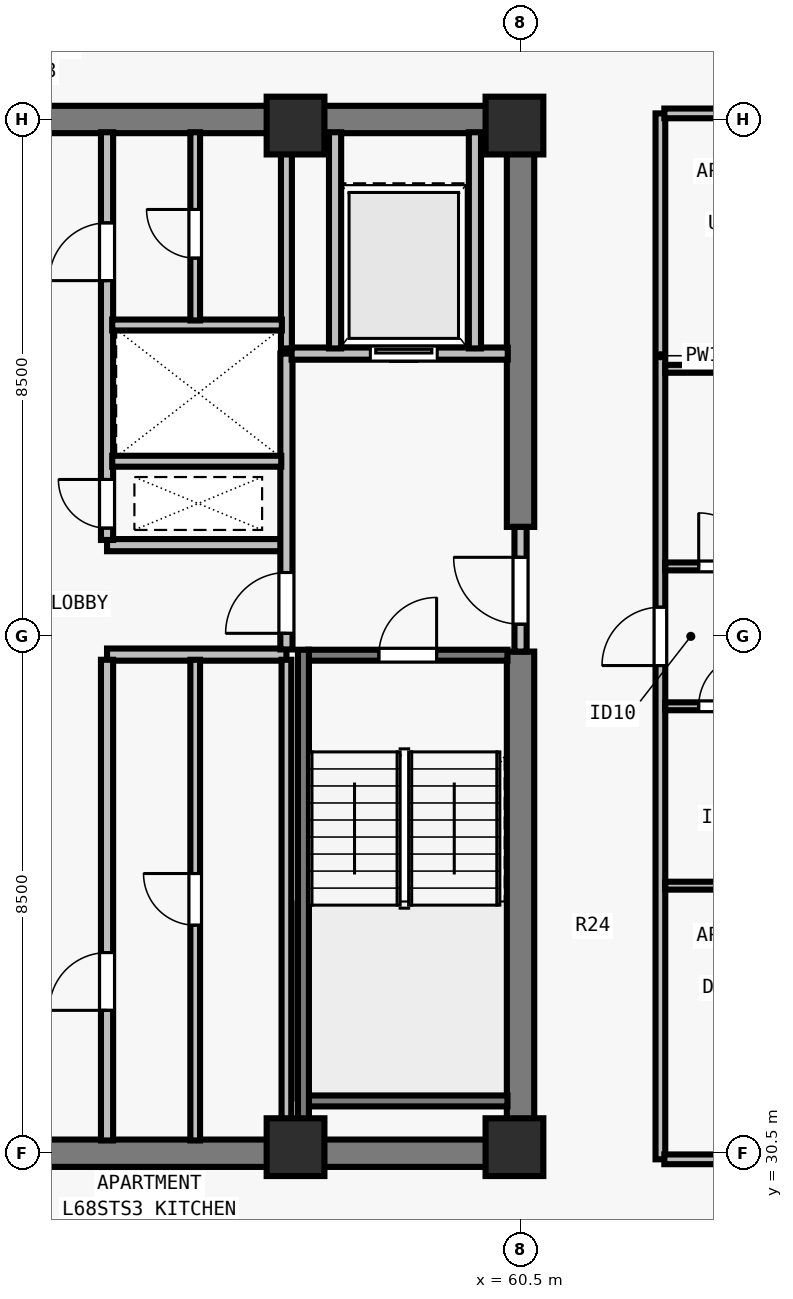
"""IFC4 building model, lengths in metres.
Left out: names, types, materials, properties, quantities, classifications, styles, units other than length and angle.
Written with IfcOpenShell. Run it as: python <this file> out.ifc"""

import sys

from ifc_helpers import new_model, si_unit, direction, frame, frame_2d, origin, origin_2d, place, context, subcontext, project, spatial, rectangle, extrude, element, fill, save


model = new_model("IFC4")
c1 = context("Model", 3, precision=1e-05, world=origin(), true_north=direction((0.0, 1.0)))
c2 = subcontext(c1, "Body", "Model", "MODEL_VIEW")
j1 = project(units=[si_unit("LENGTHUNIT", "METRE"), si_unit("PLANEANGLEUNIT", "RADIAN")], contexts=[c1])
p1 = place(None, origin())
s1 = spatial("IfcSite", under=j1, at=p1, CompositionType="ELEMENT")
p2 = place(p1, origin())
s2 = spatial("IfcBuilding", under=s1, at=p2, CompositionType="ELEMENT")
p3 = place(p2, frame((0.0, 0.0, 248.0)))
s3 = spatial("IfcBuildingStorey", under=s2, at=p3, CompositionType="ELEMENT", Elevation=248.0)
for number, where, z_axis, x_axis in (
    (1, (56.8, 30.6, 0.0), (0.0, 0.0, 1.0), (1.0, 0.0, 0.0)),
    (2, (60.4, 30.6, 0.0), (0.0, 0.0, 1.0), (1.0, 0.0, 0.0)),
    (3, (56.8, 47.4, 0.0), (0.0, 0.0, 1.0), (1.0, 0.0, 0.0)),
    (4, (60.4, 47.4, 0.0), (0.0, 0.0, 1.0), (1.0, 0.0, 0.0)),
):
    element("IfcColumn", number, at=place(p3, frame(where, z_axis=z_axis, x_axis=x_axis)), inside=s3, PredefinedType="COLUMN", context=c2, shape_type="SweptSolid", body=[
        extrude(rectangle(XDim=0.95, YDim=0.95, at=origin_2d()), origin(), (0.0, 0.0, 1.0), 3.5),
    ])
for number, where, z_axis, x_axis in (
    (5, (43.275, 30.5, 0.0), (0.0, 0.0, 1.0), (1.0, 0.0, 0.0)),
    (6, (43.275, 47.5, 0.0), (0.0, 0.0, 1.0), (1.0, 0.0, 0.0)),
):
    element("IfcWall", number, at=place(p3, frame(where, z_axis=z_axis, x_axis=x_axis)), inside=s3, PredefinedType="SHEAR", context=c2, shape_type="SweptSolid", body=[
        extrude(rectangle(XDim=17.45, YDim=0.45, at=frame_2d((8.725, 0.0))), origin(), (0.0, 0.0, 1.0), 3.29),
    ])
p4 = place(p3, frame((60.5, 30.715, 0.0), z_axis=(0.0, 0.0, 1.0), x_axis=(0.0, 1.0, 0.0)))
e7 = element("IfcWall", 7, at=p4, inside=s3, PredefinedType="SHEAR", context=c2, shape_type="SweptSolid", body=[
    extrude(rectangle(XDim=8.035, YDim=0.45, at=frame_2d((4.018, 0.0))), origin(), (0.0, 0.0, 1.0), 3.29),
])
p5 = place(p3, frame((60.5, 40.8, 0.0), z_axis=(0.0, 0.0, 1.0), x_axis=(0.0, 1.0, 0.0)))
e8 = element("IfcWall", 8, at=p5, inside=s3, PredefinedType="SHEAR", context=c2, shape_type="SweptSolid", body=[
    extrude(rectangle(XDim=6.485, YDim=0.45, at=frame_2d((3.242, 0.0))), origin(), (0.0, 0.0, 1.0), 3.29),
])
for number, where, z_axis, x_axis in (
    (9, (53.7, 38.7, 0.0), (0.0, 0.0, 1.0), (1.0, 0.0, 0.0)),
    (10, (53.7, 40.5, 0.0), (0.0, 0.0, 1.0), (1.0, 0.0, 0.0)),
):
    element("IfcWall", number, at=place(p3, frame(where, z_axis=z_axis, x_axis=x_axis)), inside=s3, PredefinedType="SOLIDWALL", context=c2, shape_type="SweptSolid", body=[
        extrude(rectangle(XDim=2.95, YDim=0.2, at=frame_2d((1.475, 0.0))), origin(), (0.0, 0.0, 1.0), 3.29),
    ])
p6 = place(p3, frame((53.7, 30.71, 0.0), z_axis=(0.0, 0.0, 1.0), x_axis=(0.0, 1.0, 0.0)))
e11 = element("IfcWall", 11, at=p6, inside=s3, PredefinedType="SOLIDWALL", context=c2, shape_type="SweptSolid", body=[
    extrude(rectangle(XDim=7.905, YDim=0.2, at=frame_2d((3.953, 0.0))), origin(), (0.0, 0.0, 1.0), 3.29),
])
p7 = place(p6, frame((2.14, 0.0, 0.0)))
e12 = element("IfcOpeningElement", 12, at=p7, cuts=e11, PredefinedType="OPENING", context=c2, shape_type="SweptSolid", body=[
    extrude(rectangle(XDim=0.95, YDim=2.12, at=frame_2d((0.475, 1.06))), frame((0.0, 0.11, 0.0), z_axis=(0.0, -1.0, 0.0), x_axis=(1.0, 0.0, 0.0)), (0.0, 0.0, 1.0), 0.22),
])
p8 = place(p3, frame((53.7, 40.585, 0.0), z_axis=(0.0, 0.0, 1.0), x_axis=(0.0, 1.0, 0.0)))
e13 = element("IfcWall", 13, at=p8, inside=s3, PredefinedType="SOLIDWALL", context=c2, shape_type="SweptSolid", body=[
    extrude(rectangle(XDim=6.705, YDim=0.2, at=frame_2d((3.353, 0.0))), origin(), (0.0, 0.0, 1.0), 3.29),
])
p9 = place(p8, frame((0.195, 0.0, 0.0)))
e14 = element("IfcOpeningElement", 14, at=p9, cuts=e13, PredefinedType="OPENING", context=c2, shape_type="SweptSolid", body=[
    extrude(rectangle(XDim=0.8, YDim=2.08, at=frame_2d((0.4, 1.04))), frame((0.0, 0.11, 0.0), z_axis=(0.0, -1.0, 0.0), x_axis=(1.0, 0.0, 0.0)), (0.0, 0.0, 1.0), 0.22),
])
p10 = place(p8, frame((4.265, 0.0, 0.0)))
e15 = element("IfcOpeningElement", 15, at=p10, cuts=e13, PredefinedType="OPENING", context=c2, shape_type="SweptSolid", body=[
    extrude(rectangle(XDim=0.95, YDim=2.12, at=frame_2d((0.475, 1.06))), frame((0.0, 0.11, 0.0), z_axis=(0.0, -1.0, 0.0), x_axis=(1.0, 0.0, 0.0)), (0.0, 0.0, 1.0), 0.22),
])
p11 = place(p3, frame((60.5, 38.75, 0.0), z_axis=(0.0, 0.0, 1.0), x_axis=(0.0, 1.0, 0.0)))
e16 = element("IfcWall", 16, at=p11, inside=s3, PredefinedType="SOLIDWALL", context=c2, shape_type="SweptSolid", body=[
    extrude(rectangle(XDim=2.05, YDim=0.2, at=frame_2d((1.025, 0.0))), origin(), (0.0, 0.0, 1.0), 3.29),
])
p12 = place(p11, frame((0.45, 0.0, 0.0)))
e17 = element("IfcOpeningElement", 17, at=p12, cuts=e16, PredefinedType="OPENING", context=c2, shape_type="SweptSolid", body=[
    extrude(rectangle(XDim=1.1, YDim=2.15, at=frame_2d((0.55, 1.075))), frame((0.0, 0.11, 0.0), z_axis=(0.0, -1.0, 0.0), x_axis=(1.0, 0.0, 0.0)), (0.0, 0.0, 1.0), 0.22),
])
p13 = place(p3, frame((56.65, 38.785, 0.0), z_axis=(0.0, 0.0, 1.0), x_axis=(0.0, 1.0, 0.0)))
e18 = element("IfcWall", 18, at=p13, inside=s3, PredefinedType="SOLIDWALL", context=c2, shape_type="SweptSolid", body=[
    extrude(rectangle(XDim=4.865, YDim=0.2, at=frame_2d((2.433, 0.0))), origin(), (0.0, 0.0, 1.0), 3.29),
])
p14 = place(p13, frame((0.265, 0.0, 0.0)))
e19 = element("IfcOpeningElement", 19, at=p14, cuts=e18, PredefinedType="OPENING", context=c2, shape_type="SweptSolid", body=[
    extrude(rectangle(XDim=1.0, YDim=2.15, at=frame_2d((0.5, 1.075))), frame((0.0, 0.11, 0.0), z_axis=(0.0, -1.0, 0.0), x_axis=(1.0, 0.0, 0.0)), (0.0, 0.0, 1.0), 0.22),
])
p15 = place(p3, frame((56.735, 43.65, 0.0), z_axis=(0.0, 0.0, 1.0), x_axis=(1.0, 0.0, 0.0)))
e20 = element("IfcWall", 20, at=p15, inside=s3, PredefinedType="SOLIDWALL", context=c2, shape_type="SweptSolid", body=[
    extrude(rectangle(XDim=3.555, YDim=0.2, at=frame_2d((1.777, 0.0))), origin(), (0.0, 0.0, 1.0), 3.29),
])
p16 = place(p15, frame((1.295, 0.0, 0.0)))
e21 = element("IfcOpeningElement", 21, at=p16, cuts=e20, PredefinedType="OPENING", context=c2, shape_type="SweptSolid", body=[
    extrude(rectangle(XDim=1.1, YDim=2.2, at=frame_2d((0.55, 1.1))), frame((0.0, 0.11, 0.0), z_axis=(0.0, -1.0, 0.0), x_axis=(1.0, 0.0, 0.0)), (0.0, 0.0, 1.0), 0.22),
])
for number, where, z_axis, x_axis in (
    (22, (57.45, 43.735, 0.0), (0.0, 0.0, 1.0), (0.0, 1.0, 0.0)),
    (23, (59.75, 43.735, 0.0), (0.0, 0.0, 1.0), (0.0, 1.0, 0.0)),
):
    element("IfcWall", number, at=place(p3, frame(where, z_axis=z_axis, x_axis=x_axis)), inside=s3, PredefinedType="SOLIDWALL", context=c2, shape_type="SweptSolid", body=[
        extrude(rectangle(XDim=3.555, YDim=0.2, at=frame_2d((1.777, 0.0))), origin(), (0.0, 0.0, 1.0), 3.29),
    ])
p17 = place(p3, frame((56.65, 30.71, 0.0), z_axis=(0.0, 0.0, 1.0), x_axis=(0.0, 1.0, 0.0)))
e24 = element("IfcWall", 24, at=p17, inside=s3, PredefinedType="PARTITIONING", context=c2, shape_type="SweptSolid", body=[
    extrude(rectangle(XDim=7.905, YDim=0.16, at=frame_2d((3.953, 0.0))), origin(), (0.0, 0.0, 1.0), 3.29),
])
p18 = place(p3, frame((55.15, 30.71, 0.0), z_axis=(0.0, 0.0, 1.0), x_axis=(0.0, 1.0, 0.0)))
e25 = element("IfcWall", 25, at=p18, inside=s3, PredefinedType="PARTITIONING", context=c2, shape_type="SweptSolid", body=[
    extrude(rectangle(XDim=7.905, YDim=0.16, at=frame_2d((3.953, 0.0))), origin(), (0.0, 0.0, 1.0), 3.29),
])
p19 = place(p18, frame((3.54, 0.0, 0.0)))
e26 = element("IfcOpeningElement", 26, at=p19, cuts=e25, PredefinedType="OPENING", context=c2, shape_type="SweptSolid", body=[
    extrude(rectangle(XDim=0.85, YDim=2.12, at=frame_2d((0.425, 1.06))), frame((0.0, 0.09, 0.0), z_axis=(0.0, -1.0, 0.0), x_axis=(1.0, 0.0, 0.0)), (0.0, 0.0, 1.0), 0.18),
])
p20 = place(p3, frame((56.65, 43.735, 0.0), z_axis=(0.0, 0.0, 1.0), x_axis=(0.0, 1.0, 0.0)))
e27 = element("IfcWall", 27, at=p20, inside=s3, PredefinedType="SOLIDWALL", context=c2, shape_type="SweptSolid", body=[
    extrude(rectangle(XDim=3.555, YDim=0.18, at=frame_2d((1.777, 0.0))), origin(), (0.0, 0.0, 1.0), 3.29),
])
p21 = place(p3, frame((53.785, 41.88, 0.0), z_axis=(0.0, 0.0, 1.0), x_axis=(1.0, 0.0, 0.0)))
e28 = element("IfcWall", 28, at=p21, inside=s3, PredefinedType="SOLIDWALL", context=c2, shape_type="SweptSolid", body=[
    extrude(rectangle(XDim=2.78, YDim=0.18, at=frame_2d((1.39, 0.0))), origin(), (0.0, 0.0, 1.0), 3.29),
])
p22 = place(p3, frame((53.785, 44.12, 0.0), z_axis=(0.0, 0.0, 1.0), x_axis=(1.0, 0.0, 0.0)))
e29 = element("IfcWall", 29, at=p22, inside=s3, PredefinedType="SOLIDWALL", context=c2, shape_type="SweptSolid", body=[
    extrude(rectangle(XDim=2.79, YDim=0.18, at=frame_2d((1.395, 0.0))), origin(), (0.0, 0.0, 1.0), 3.29),
])
p23 = place(p3, frame((55.15, 44.195, 0.0), z_axis=(0.0, 0.0, 1.0), x_axis=(0.0, 1.0, 0.0)))
e30 = element("IfcWall", 30, at=p23, inside=s3, PredefinedType="PARTITIONING", context=c2, shape_type="SweptSolid", body=[
    extrude(rectangle(XDim=3.095, YDim=0.16, at=frame_2d((1.547, 0.0))), origin(), (0.0, 0.0, 1.0), 3.29),
])
p24 = place(p23, frame((1.025, 0.0, 0.0)))
e31 = element("IfcOpeningElement", 31, at=p24, cuts=e30, PredefinedType="OPENING", context=c2, shape_type="SweptSolid", body=[
    extrude(rectangle(XDim=0.8, YDim=2.1, at=frame_2d((0.4, 1.05))), frame((0.0, 0.09, 0.0), z_axis=(0.0, -1.0, 0.0), x_axis=(1.0, 0.0, 0.0)), (0.0, 0.0, 1.0), 0.18),
])
p25 = place(p3, frame((62.8, 30.4, 0.0), z_axis=(0.0, 0.0, 1.0), x_axis=(0.0, 1.0, 0.0)))
e32 = element("IfcWall", 32, at=p25, inside=s3, PredefinedType="PARTITIONING", context=c2, shape_type="SweptSolid", body=[
    extrude(rectangle(XDim=17.2, YDim=0.16, at=frame_2d((8.6, 0.0))), origin(), (0.0, 0.0, 1.0), 3.29),
])
p26 = place(p25, frame((8.12, 0.0, 0.0)))
e33 = element("IfcOpeningElement", 33, at=p26, cuts=e32, PredefinedType="OPENING", context=c2, shape_type="SweptSolid", body=[
    extrude(rectangle(XDim=0.96, YDim=2.18, at=frame_2d((0.48, 1.09))), frame((0.0, 0.09, 0.0), z_axis=(0.0, -1.0, 0.0), x_axis=(1.0, 0.0, 0.0)), (0.0, 0.0, 1.0), 0.18),
])
for number, where, z_axis, x_axis in (
    (34, (62.865, 30.4, 0.0), (0.0, 0.0, 1.0), (1.0, 0.0, 0.0)),
    (35, (62.865, 47.6, 0.0), (0.0, 0.0, 1.0), (1.0, 0.0, 0.0)),
):
    element("IfcWall", number, at=place(p3, frame(where, z_axis=z_axis, x_axis=x_axis)), inside=s3, PredefinedType="PARTITIONING", context=c2, shape_type="SweptSolid", body=[
        extrude(rectangle(XDim=11.33, YDim=0.16, at=frame_2d((5.665, 0.0))), origin(), (0.0, 0.0, 1.0), 3.29),
    ])
p27 = place(p3, frame((62.88, 34.9, 0.0), z_axis=(0.0, 0.0, 1.0), x_axis=(1.0, 0.0, 0.0)))
e36 = element("IfcWall", 36, at=p27, inside=s3, PredefinedType="PLUMBINGWALL", context=c2, shape_type="SweptSolid", body=[
    extrude(rectangle(XDim=2.75, YDim=0.13, at=frame_2d((1.375, 0.0))), origin(), (0.0, 0.0, 1.0), 3.29),
])
p28 = place(p3, frame((62.88, 37.85, 0.0), z_axis=(0.0, 0.0, 1.0), x_axis=(1.0, 0.0, 0.0)))
e37 = element("IfcWall", 37, at=p28, inside=s3, PredefinedType="PLUMBINGWALL", context=c2, shape_type="SweptSolid", body=[
    extrude(rectangle(XDim=2.75, YDim=0.13, at=frame_2d((1.375, 0.0))), origin(), (0.0, 0.0, 1.0), 3.29),
])
p29 = place(p28, frame((0.55, 0.0, 0.0)))
e38 = element("IfcOpeningElement", 38, at=p29, cuts=e37, PredefinedType="OPENING", context=c2, shape_type="SweptSolid", body=[
    extrude(rectangle(XDim=0.85, YDim=2.08, at=frame_2d((0.425, 1.04))), frame((0.0, 0.075, 0.0), z_axis=(0.0, -1.0, 0.0), x_axis=(1.0, 0.0, 0.0)), (0.0, 0.0, 1.0), 0.15),
])
p30 = place(p3, frame((62.88, 43.4, 0.0), z_axis=(0.0, 0.0, 1.0), x_axis=(1.0, 0.0, 0.0)))
e39 = element("IfcWall", 39, at=p30, inside=s3, PredefinedType="PLUMBINGWALL", context=c2, shape_type="SweptSolid", body=[
    extrude(rectangle(XDim=2.75, YDim=0.13, at=frame_2d((1.375, 0.0))), origin(), (0.0, 0.0, 1.0), 3.29),
])
p31 = place(p3, frame((62.88, 40.15, 0.0), z_axis=(0.0, 0.0, 1.0), x_axis=(1.0, 0.0, 0.0)))
e40 = element("IfcWall", 40, at=p31, inside=s3, PredefinedType="PLUMBINGWALL", context=c2, shape_type="SweptSolid", body=[
    extrude(rectangle(XDim=2.75, YDim=0.13, at=frame_2d((1.375, 0.0))), origin(), (0.0, 0.0, 1.0), 3.29),
])
p32 = place(p31, frame((0.55, 0.0, 0.0)))
e41 = element("IfcOpeningElement", 41, at=p32, cuts=e40, PredefinedType="OPENING", context=c2, shape_type="SweptSolid", body=[
    extrude(rectangle(XDim=0.88, YDim=2.1, at=frame_2d((0.44, 1.05))), frame((0.0, 0.075, 0.0), z_axis=(0.0, -1.0, 0.0), x_axis=(1.0, 0.0, 0.0)), (0.0, 0.0, 1.0), 0.15),
])
p33 = place(p3, frame((57.005, 38.69, 0.0), z_axis=(0.0, 0.0, 1.0), x_axis=(1.0, 0.0, 0.0)))
e42 = element("IfcWall", 42, at=p33, inside=s3, PredefinedType="SOLIDWALL", context=c2, shape_type="SweptSolid", body=[
    extrude(rectangle(XDim=3.28, YDim=0.18, at=frame_2d((1.64, 0.0))), origin(), (0.0, 0.0, 1.0), 3.29),
])
p34 = place(p33, frame((1.165, 0.0, 0.0)))
e43 = element("IfcOpeningElement", 43, at=p34, cuts=e42, PredefinedType="OPENING", context=c2, shape_type="SweptSolid", body=[
    extrude(rectangle(XDim=0.95, YDim=2.15, at=frame_2d((0.475, 1.075))), frame((0.0, 0.1, 0.0), z_axis=(0.0, -1.0, 0.0), x_axis=(1.0, 0.0, 0.0)), (0.0, 0.0, 1.0), 0.2),
])
p35 = place(p3, frame((57.005, 31.36, 0.0), z_axis=(0.0, 0.0, 1.0), x_axis=(1.0, 0.0, 0.0)))
e44 = element("IfcWall", 44, at=p35, inside=s3, PredefinedType="SOLIDWALL", context=c2, shape_type="SweptSolid", body=[
    extrude(rectangle(XDim=3.28, YDim=0.18, at=frame_2d((1.64, 0.0))), origin(), (0.0, 0.0, 1.0), 3.29),
])
p36 = place(p3, frame((56.93, 38.78, 0.0), z_axis=(0.0, 0.0, 1.0), x_axis=(0.0, -1.0, 0.0)))
e45 = element("IfcWall", 45, at=p36, inside=s3, PredefinedType="SOLIDWALL", context=c2, shape_type="SweptSolid", body=[
    extrude(rectangle(XDim=8.067, YDim=0.18, at=frame_2d((4.034, 0.0))), origin(), (0.0, 0.0, 1.0), 3.29),
])
p37 = place(p12, origin())
e46 = element("IfcDoor", 46, at=p37, inside=s3, OperationType="SINGLE_SWING_RIGHT", PredefinedType="DOOR", context=c2, shape_type="SweptSolid", body=[
    extrude(rectangle(XDim=1.1, YDim=2.15, at=frame_2d((0.55, 1.075))), frame((0.0, 0.025, 0.0), z_axis=(0.0, -1.0, 0.0), x_axis=(1.0, 0.0, 0.0)), (0.0, 0.0, 1.0), 0.05),
])
fill(e17, e46)
p38 = place(p14, origin())
e47 = element("IfcDoor", 47, at=p38, inside=s3, OperationType="SINGLE_SWING_LEFT", PredefinedType="DOOR", context=c2, shape_type="SweptSolid", body=[
    extrude(rectangle(XDim=1.0, YDim=2.15, at=frame_2d((0.5, 1.075))), frame((0.0, 0.025, 0.0), z_axis=(0.0, -1.0, 0.0), x_axis=(1.0, 0.0, 0.0)), (0.0, 0.0, 1.0), 0.05),
])
fill(e19, e47)
p39 = place(p16, origin())
e48 = element("IfcDoor", 48, at=p39, inside=s3, OperationType="SLIDING_TO_LEFT", PredefinedType="DOOR", context=c2, shape_type="SweptSolid", body=[
    extrude(rectangle(XDim=1.1, YDim=2.2, at=frame_2d((0.55, 1.1))), frame((0.0, 0.025, 0.0), z_axis=(0.0, -1.0, 0.0), x_axis=(1.0, 0.0, 0.0)), (0.0, 0.0, 1.0), 0.05),
])
fill(e21, e48)
p40 = place(p7, origin())
e49 = element("IfcDoor", 49, at=p40, inside=s3, OperationType="SINGLE_SWING_LEFT", PredefinedType="DOOR", context=c2, shape_type="SweptSolid", body=[
    extrude(rectangle(XDim=0.95, YDim=2.12, at=frame_2d((0.475, 1.06))), frame((0.0, 0.025, 0.0), z_axis=(0.0, -1.0, 0.0), x_axis=(1.0, 0.0, 0.0)), (0.0, 0.0, 1.0), 0.05),
])
fill(e12, e49)
p41 = place(p19, origin())
e50 = element("IfcDoor", 50, at=p41, inside=s3, OperationType="SINGLE_SWING_RIGHT", PredefinedType="DOOR", context=c2, shape_type="SweptSolid", body=[
    extrude(rectangle(XDim=0.85, YDim=2.12, at=frame_2d((0.425, 1.06))), frame((0.0, 0.025, 0.0), z_axis=(0.0, -1.0, 0.0), x_axis=(1.0, 0.0, 0.0)), (0.0, 0.0, 1.0), 0.05),
])
fill(e26, e50)
p42 = place(p9, origin())
e51 = element("IfcDoor", 51, at=p42, inside=s3, OperationType="SINGLE_SWING_RIGHT", PredefinedType="DOOR", context=c2, shape_type="SweptSolid", body=[
    extrude(rectangle(XDim=0.8, YDim=2.08, at=frame_2d((0.4, 1.04))), frame((0.0, 0.025, 0.0), z_axis=(0.0, -1.0, 0.0), x_axis=(1.0, 0.0, 0.0)), (0.0, 0.0, 1.0), 0.05),
])
fill(e14, e51)
p43 = place(p10, origin())
e52 = element("IfcDoor", 52, at=p43, inside=s3, OperationType="SINGLE_SWING_LEFT", PredefinedType="DOOR", context=c2, shape_type="SweptSolid", body=[
    extrude(rectangle(XDim=0.95, YDim=2.12, at=frame_2d((0.475, 1.06))), frame((0.0, 0.025, 0.0), z_axis=(0.0, -1.0, 0.0), x_axis=(1.0, 0.0, 0.0)), (0.0, 0.0, 1.0), 0.05),
])
fill(e15, e52)
p44 = place(p24, origin())
e53 = element("IfcDoor", 53, at=p44, inside=s3, OperationType="SINGLE_SWING_RIGHT", PredefinedType="DOOR", context=c2, shape_type="SweptSolid", body=[
    extrude(rectangle(XDim=0.8, YDim=2.1, at=frame_2d((0.4, 1.05))), frame((0.0, 0.025, 0.0), z_axis=(0.0, -1.0, 0.0), x_axis=(1.0, 0.0, 0.0)), (0.0, 0.0, 1.0), 0.05),
])
fill(e31, e53)
p45 = place(p29, origin())
e54 = element("IfcDoor", 54, at=p45, inside=s3, OperationType="SINGLE_SWING_RIGHT", PredefinedType="DOOR", context=c2, shape_type="SweptSolid", body=[
    extrude(rectangle(XDim=0.85, YDim=2.08, at=frame_2d((0.425, 1.04))), frame((0.0, 0.025, 0.0), z_axis=(0.0, -1.0, 0.0), x_axis=(1.0, 0.0, 0.0)), (0.0, 0.0, 1.0), 0.05),
])
fill(e38, e54)
p46 = place(p32, origin())
e55 = element("IfcDoor", 55, at=p46, inside=s3, OperationType="SINGLE_SWING_LEFT", PredefinedType="DOOR", context=c2, shape_type="SweptSolid", body=[
    extrude(rectangle(XDim=0.88, YDim=2.1, at=frame_2d((0.44, 1.05))), frame((0.0, 0.025, 0.0), z_axis=(0.0, -1.0, 0.0), x_axis=(1.0, 0.0, 0.0)), (0.0, 0.0, 1.0), 0.05),
])
fill(e41, e55)
p47 = place(p26, origin())
e56 = element("IfcDoor", 56, at=p47, inside=s3, OperationType="SINGLE_SWING_LEFT", PredefinedType="DOOR", context=c2, shape_type="SweptSolid", body=[
    extrude(rectangle(XDim=0.96, YDim=2.18, at=frame_2d((0.48, 1.09))), frame((0.0, 0.025, 0.0), z_axis=(0.0, -1.0, 0.0), x_axis=(1.0, 0.0, 0.0)), (0.0, 0.0, 1.0), 0.05),
])
fill(e33, e56)
p48 = place(p34, origin())
e57 = element("IfcDoor", 57, at=p48, inside=s3, OperationType="SINGLE_SWING_RIGHT", PredefinedType="DOOR", context=c2, shape_type="SweptSolid", body=[
    extrude(rectangle(XDim=0.95, YDim=2.15, at=frame_2d((0.475, 1.075))), frame((0.0, 0.025, 0.0), z_axis=(0.0, -1.0, 0.0), x_axis=(1.0, 0.0, 0.0)), (0.0, 0.0, 1.0), 0.05),
])
fill(e43, e57)
save(model, sys.argv[1])
